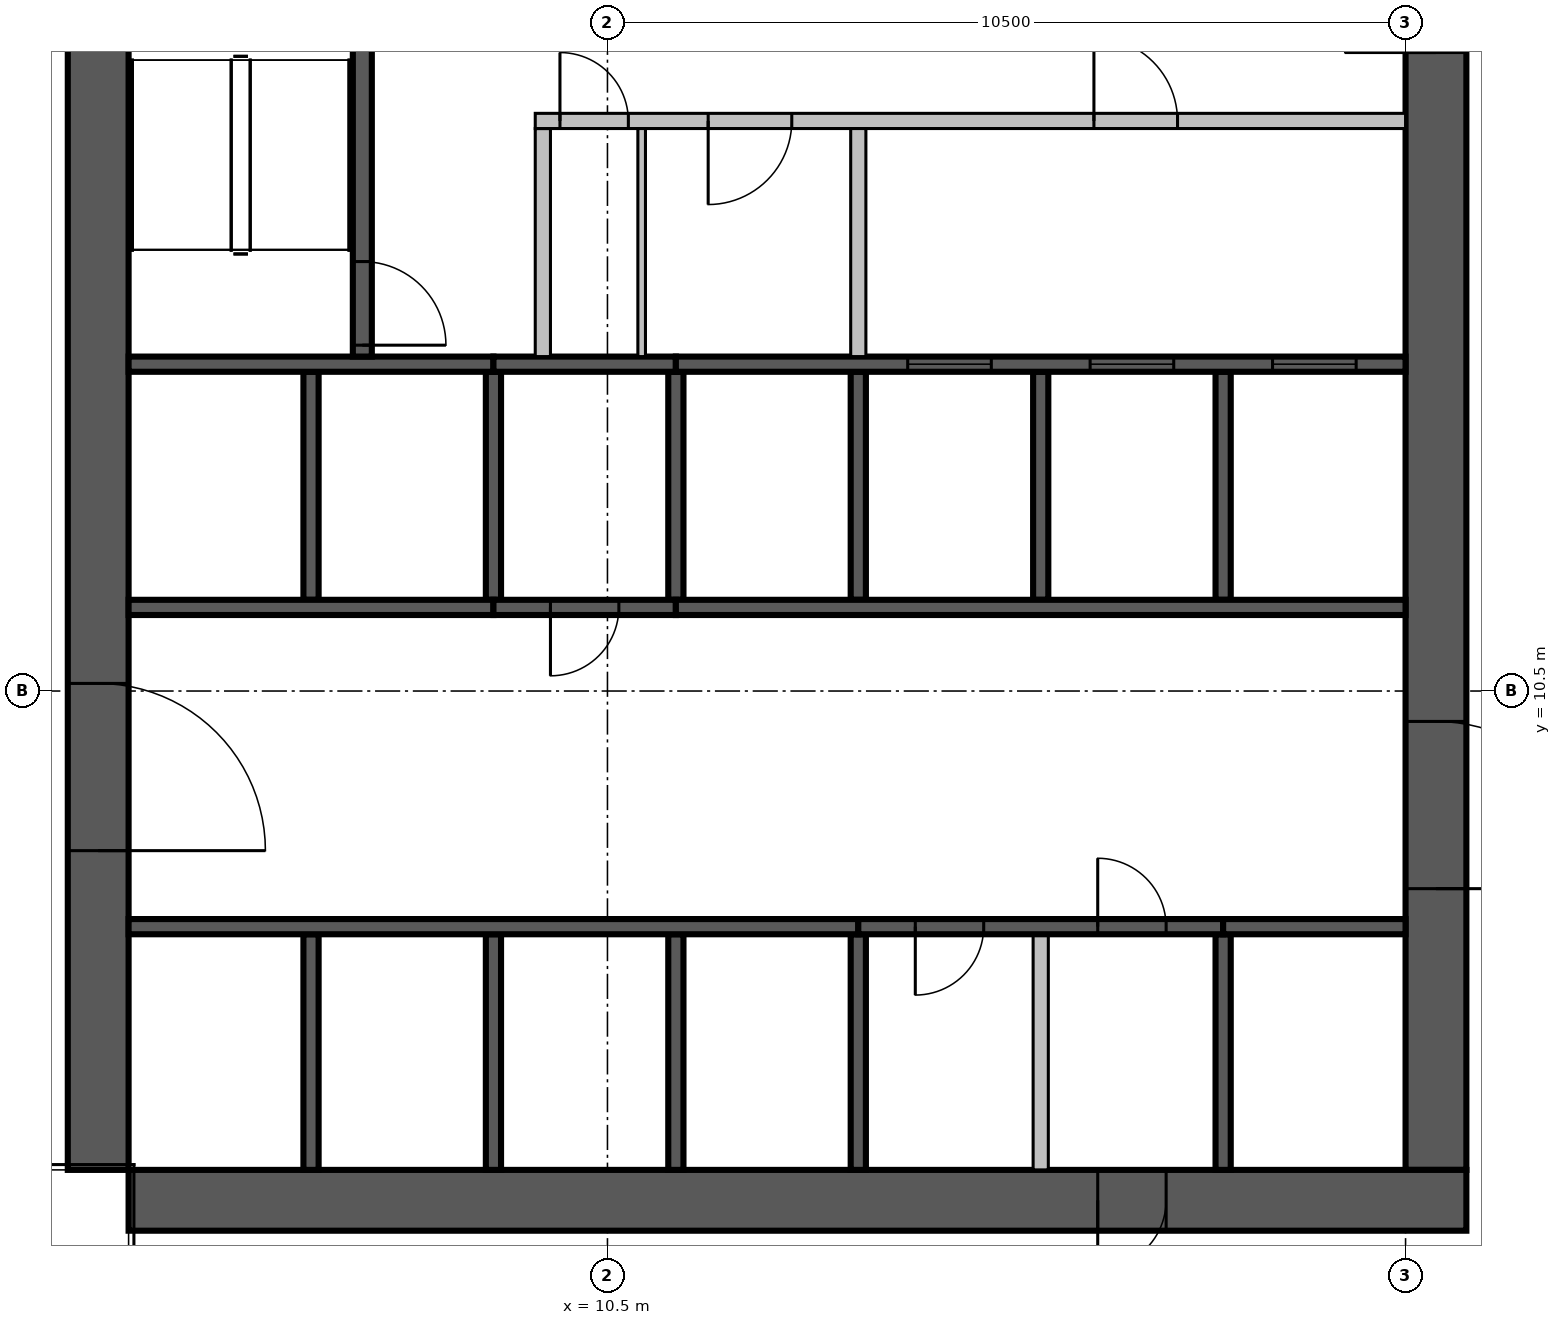
"""IFC4 building model, lengths in metres.
Left out: names, types, materials, properties, quantities, classifications, styles, units other than length and angle.
Written with IfcOpenShell. Run it as: python <this file> out.ifc"""

import sys

from ifc_helpers import new_model, si_unit, direction, frame, frame_2d, origin, place, context, subcontext, project, spatial, rectangle, extrude, source, transform, mapped, element, fill, save


model = new_model("IFC4")
c1 = context("Model", 3, precision=1e-05, world=origin(), true_north=direction((0.0, 1.0)))
c2 = subcontext(c1, "Body", "Model", "MODEL_VIEW")
j1 = project(units=[si_unit("LENGTHUNIT", "METRE"), si_unit("PLANEANGLEUNIT", "RADIAN")], contexts=[c1])
p1 = place(None, origin())
s1 = spatial("IfcSite", under=j1, at=p1, CompositionType="ELEMENT")
p2 = place(p1, origin())
s2 = spatial("IfcBuilding", under=s1, at=p2, CompositionType="ELEMENT")
p3 = place(p2, frame((0.0, 0.0, 269.0)))
s3 = spatial("IfcBuildingStorey", under=s2, at=p3, CompositionType="ELEMENT", Elevation=269.0)
p4 = place(p3, frame((3.8, 4.2, 0.0), z_axis=(0.0, 0.0, 1.0), x_axis=(0.0, 1.0, 0.0)))
e1 = element("IfcWall", 1, at=p4, inside=s3, PredefinedType="SHEAR", context=c2, shape_type="SweptSolid", body=[
    extrude(rectangle(XDim=17.6, YDim=0.8, at=frame_2d((8.8, 0.0))), origin(), (0.0, 0.0, 1.0), 8.0),
])
m1 = source(origin(), c2, "Body", "SweptSolid", [
    extrude(rectangle(XDim=2.2, YDim=2.1, at=frame_2d((1.1, 1.05))), frame((0.0, 0.41, 0.0), z_axis=(0.0, -1.0, 0.0), x_axis=(1.0, 0.0, 0.0)), (0.0, 0.0, 1.0), 0.82),
])
p5 = place(p4, frame((4.2, 0.0, 0.0)))
e2 = element("IfcOpeningElement", 2, at=p5, cuts=e1, PredefinedType="OPENING", context=c2, shape_type="MappedRepresentation", body=[
    mapped(m1, transform((0.0, 0.0, 0.0), scale=1.0)),
])
p6 = place(p3, frame((21.4, 4.2, 0.0), z_axis=(0.0, 0.0, 1.0), x_axis=(0.0, 1.0, 0.0)))
e3 = element("IfcWall", 3, at=p6, inside=s3, PredefinedType="SHEAR", context=c2, shape_type="SweptSolid", body=[
    extrude(rectangle(XDim=16.8, YDim=0.8, at=frame_2d((8.4, 0.0))), origin(), (0.0, 0.0, 1.0), 8.0),
])
p7 = place(p6, frame((3.7, 0.0, 0.0)))
e4 = element("IfcOpeningElement", 4, at=p7, cuts=e3, PredefinedType="OPENING", context=c2, shape_type="MappedRepresentation", body=[
    mapped(m1, transform((0.0, 0.0, 0.0), scale=1.0)),
])
m2 = source(origin(), c2, "Body", "SweptSolid", [
    extrude(rectangle(XDim=1.2, YDim=2.1, at=frame_2d((0.6, 1.05))), frame((0.0, 0.41, 0.0), z_axis=(0.0, -1.0, 0.0), x_axis=(1.0, 0.0, 0.0)), (0.0, 0.0, 1.0), 0.82),
])
p8 = place(p6, frame((14.7, 0.0, 0.0)))
e5 = element("IfcOpeningElement", 5, at=p8, cuts=e3, PredefinedType="OPENING", context=c2, shape_type="MappedRepresentation", body=[
    mapped(m2, transform((0.0, 0.0, 0.0), scale=1.0)),
])
m3 = source(origin(), c2, "Body", "SweptSolid", [
    extrude(rectangle(XDim=17.6, YDim=0.8, at=frame_2d((8.8, 0.0))), origin(), (0.0, 0.0, 1.0), 8.0),
])
p9 = place(p3, frame((4.2, 3.8, 0.0), z_axis=(0.0, 0.0, 1.0), x_axis=(1.0, 0.0, 0.0)))
e6 = element("IfcWall", 6, at=p9, inside=s3, PredefinedType="SHEAR", context=c2, shape_type="MappedRepresentation", body=[
    mapped(m3, transform((0.0, 0.0, 0.0), scale=1.0)),
])
m4 = source(origin(), c2, "Body", "SweptSolid", [
    extrude(rectangle(XDim=0.9, YDim=2.1, at=frame_2d((0.45, 1.05))), frame((0.0, 0.41, 0.0), z_axis=(0.0, -1.0, 0.0), x_axis=(1.0, 0.0, 0.0)), (0.0, 0.0, 1.0), 0.82),
])
p10 = place(p9, frame((12.75, 0.0, 0.0)))
e7 = element("IfcOpeningElement", 7, at=p10, cuts=e6, PredefinedType="OPENING", context=c2, shape_type="MappedRepresentation", body=[
    mapped(m4, transform((0.0, 0.0, 0.0), scale=1.0)),
])
m5 = source(origin(), c2, "Body", "SweptSolid", [
    extrude(rectangle(XDim=3.1, YDim=0.2, at=frame_2d((1.55, 0.0))), origin(), (0.0, 0.0, 1.0), 8.0),
])
for number, where, z_axis, x_axis in (
    (8, (6.6, 4.2, 0.0), (0.0, 0.0, 1.0), (0.0, 1.0, 0.0)),
    (9, (9.0, 4.2, 0.0), (0.0, 0.0, 1.0), (0.0, 1.0, 0.0)),
    (10, (11.4, 4.2, 0.0), (0.0, 0.0, 1.0), (0.0, 1.0, 0.0)),
):
    element("IfcWall", number, at=place(p3, frame(where, z_axis=z_axis, x_axis=x_axis)), inside=s3, PredefinedType="SOLIDWALL", context=c2, shape_type="MappedRepresentation", body=[
        mapped(m5, transform((0.0, 0.0, 0.0), scale=1.0)),
    ])
p11 = place(p3, frame((13.8, 4.2, 0.0), z_axis=(0.0, 0.0, 1.0), x_axis=(0.0, 1.0, 0.0)))
e11 = element("IfcWall", 11, at=p11, inside=s3, PredefinedType="SOLIDWALL", context=c2, shape_type="SweptSolid", body=[
    extrude(rectangle(XDim=3.1, YDim=0.2, at=frame_2d((1.55, 0.0))), origin(), (0.0, 0.0, 1.0), 7.6),
])
m6 = source(origin(), c2, "Body", "SweptSolid", [
    extrude(rectangle(XDim=3.1, YDim=0.2, at=frame_2d((1.55, 0.0))), origin(), (0.0, 0.0, 1.0), 7.6),
])
p12 = place(p3, frame((18.6, 4.2, 0.0), z_axis=(0.0, 0.0, 1.0), x_axis=(0.0, 1.0, 0.0)))
e12 = element("IfcWall", 12, at=p12, inside=s3, PredefinedType="SOLIDWALL", context=c2, shape_type="MappedRepresentation", body=[
    mapped(m6, transform((0.0, 0.0, 0.0), scale=1.0)),
])
p13 = place(p3, frame((16.2, 4.2, 0.0), z_axis=(0.0, 0.0, 1.0), x_axis=(0.0, 1.0, 0.0)))
e13 = element("IfcWall", 13, at=p13, inside=s3, PredefinedType="PARTITIONING", context=c2, shape_type="SweptSolid", body=[
    extrude(rectangle(XDim=3.1, YDim=0.2, at=frame_2d((1.55, 0.0))), origin(), (0.0, 0.0, 1.0), 7.6),
])
m7 = source(origin(), c2, "Body", "SweptSolid", [
    extrude(rectangle(XDim=3.0, YDim=0.2, at=frame_2d((1.5, 0.0))), origin(), (0.0, 0.0, 1.0), 8.0),
])
p14 = place(p3, frame((6.6, 11.7, 0.0), z_axis=(0.0, 0.0, 1.0), x_axis=(0.0, 1.0, 0.0)))
e14 = element("IfcWall", 14, at=p14, inside=s3, PredefinedType="SOLIDWALL", context=c2, shape_type="MappedRepresentation", body=[
    mapped(m7, transform((0.0, 0.0, 0.0), scale=1.0)),
])
m8 = source(origin(), c2, "Body", "SweptSolid", [
    extrude(rectangle(XDim=3.0, YDim=0.2, at=frame_2d((1.5, 0.0))), origin(), (0.0, 0.0, 1.0), 7.6),
])
for number, where, z_axis, x_axis in (
    (15, (9.0, 11.7, 0.0), (0.0, 0.0, 1.0), (0.0, 1.0, 0.0)),
    (16, (11.4, 11.7, 0.0), (0.0, 0.0, 1.0), (0.0, 1.0, 0.0)),
):
    element("IfcWall", number, at=place(p3, frame(where, z_axis=z_axis, x_axis=x_axis)), inside=s3, PredefinedType="SOLIDWALL", context=c2, shape_type="MappedRepresentation", body=[
        mapped(m8, transform((0.0, 0.0, 0.0), scale=1.0)),
    ])
for number, where, z_axis, x_axis in (
    (17, (13.8, 11.7, 0.0), (0.0, 0.0, 1.0), (0.0, 1.0, 0.0)),
    (18, (16.2, 11.7, 0.0), (0.0, 0.0, 1.0), (0.0, 1.0, 0.0)),
    (19, (18.6, 11.7, 0.0), (0.0, 0.0, 1.0), (0.0, 1.0, 0.0)),
):
    element("IfcWall", number, at=place(p3, frame(where, z_axis=z_axis, x_axis=x_axis)), inside=s3, PredefinedType="SOLIDWALL", context=c2, shape_type="MappedRepresentation", body=[
        mapped(m7, transform((0.0, 0.0, 0.0), scale=1.0)),
    ])
m9 = source(origin(), c2, "Body", "SweptSolid", [
    extrude(rectangle(XDim=9.6, YDim=0.2, at=frame_2d((4.8, 0.0))), origin(), (0.0, 0.0, 1.0), 8.0),
])
p15 = place(p3, frame((4.2, 7.4, 0.0), z_axis=(0.0, 0.0, 1.0), x_axis=(1.0, 0.0, 0.0)))
e20 = element("IfcWall", 20, at=p15, inside=s3, PredefinedType="SOLIDWALL", context=c2, shape_type="MappedRepresentation", body=[
    mapped(m9, transform((0.0, 0.0, 0.0), scale=1.0)),
])
p16 = place(p3, frame((13.8, 7.4, 0.0), z_axis=(0.0, 0.0, 1.0), x_axis=(1.0, 0.0, 0.0)))
e21 = element("IfcWall", 21, at=p16, inside=s3, PredefinedType="SOLIDWALL", context=c2, shape_type="SweptSolid", body=[
    extrude(rectangle(XDim=4.8, YDim=0.2, at=frame_2d((2.4, 0.0))), origin(), (0.0, 0.0, 1.0), 7.6),
])
m10 = source(origin(), c2, "Body", "SweptSolid", [
    extrude(rectangle(XDim=0.9, YDim=2.1, at=frame_2d((0.45, 1.05))), frame((0.0, 0.11, 0.0), z_axis=(0.0, -1.0, 0.0), x_axis=(1.0, 0.0, 0.0)), (0.0, 0.0, 1.0), 0.22),
])
p17 = place(p16, frame((0.75, 0.0, 0.0)))
e22 = element("IfcOpeningElement", 22, at=p17, cuts=e21, PredefinedType="OPENING", context=c2, shape_type="MappedRepresentation", body=[
    mapped(m10, transform((0.0, 0.0, 0.0), scale=1.0)),
])
p18 = place(p16, frame((3.15, 0.0, 0.0)))
e23 = element("IfcOpeningElement", 23, at=p18, cuts=e21, PredefinedType="OPENING", context=c2, shape_type="MappedRepresentation", body=[
    mapped(m10, transform((0.0, 0.0, 0.0), scale=1.0)),
])
p19 = place(p3, frame((18.6, 7.4, 0.0), z_axis=(0.0, 0.0, 1.0), x_axis=(1.0, 0.0, 0.0)))
e24 = element("IfcWall", 24, at=p19, inside=s3, PredefinedType="SOLIDWALL", context=c2, shape_type="SweptSolid", body=[
    extrude(rectangle(XDim=2.4, YDim=0.2, at=frame_2d((1.2, 0.0))), origin(), (0.0, 0.0, 1.0), 8.0),
])
m11 = source(origin(), c2, "Body", "SweptSolid", [
    extrude(rectangle(XDim=4.8, YDim=0.2, at=frame_2d((2.4, 0.0))), origin(), (0.0, 0.0, 1.0), 8.0),
])
p20 = place(p3, frame((4.2, 11.6, 0.0), z_axis=(0.0, 0.0, 1.0), x_axis=(1.0, 0.0, 0.0)))
e25 = element("IfcWall", 25, at=p20, inside=s3, PredefinedType="SOLIDWALL", context=c2, shape_type="MappedRepresentation", body=[
    mapped(m11, transform((0.0, 0.0, 0.0), scale=1.0)),
])
m12 = source(origin(), c2, "Body", "SweptSolid", [
    extrude(rectangle(XDim=2.4, YDim=0.2, at=frame_2d((1.2, 0.0))), origin(), (0.0, 0.0, 1.0), 7.6),
])
p21 = place(p3, frame((9.0, 11.6, 0.0), z_axis=(0.0, 0.0, 1.0), x_axis=(1.0, 0.0, 0.0)))
e26 = element("IfcWall", 26, at=p21, inside=s3, PredefinedType="SOLIDWALL", context=c2, shape_type="MappedRepresentation", body=[
    mapped(m12, transform((0.0, 0.0, 0.0), scale=1.0)),
])
p22 = place(p21, frame((0.75, 0.0, 0.0)))
e27 = element("IfcOpeningElement", 27, at=p22, cuts=e26, PredefinedType="OPENING", context=c2, shape_type="MappedRepresentation", body=[
    mapped(m10, transform((0.0, 0.0, 0.0), scale=1.0)),
])
p23 = place(p3, frame((11.4, 11.6, 0.0), z_axis=(0.0, 0.0, 1.0), x_axis=(1.0, 0.0, 0.0)))
e28 = element("IfcWall", 28, at=p23, inside=s3, PredefinedType="SOLIDWALL", context=c2, shape_type="MappedRepresentation", body=[
    mapped(m9, transform((0.0, 0.0, 0.0), scale=1.0)),
])
p24 = place(p3, frame((4.2, 14.8, 0.0), z_axis=(0.0, 0.0, 1.0), x_axis=(1.0, 0.0, 0.0)))
e29 = element("IfcWall", 29, at=p24, inside=s3, PredefinedType="SOLIDWALL", context=c2, shape_type="MappedRepresentation", body=[
    mapped(m11, transform((0.0, 0.0, 0.0), scale=1.0)),
])
p25 = place(p3, frame((9.0, 14.8, 0.0), z_axis=(0.0, 0.0, 1.0), x_axis=(1.0, 0.0, 0.0)))
e30 = element("IfcWall", 30, at=p25, inside=s3, PredefinedType="SOLIDWALL", context=c2, shape_type="MappedRepresentation", body=[
    mapped(m12, transform((0.0, 0.0, 0.0), scale=1.0)),
])
p26 = place(p3, frame((11.4, 14.8, 0.0), z_axis=(0.0, 0.0, 1.0), x_axis=(1.0, 0.0, 0.0)))
e31 = element("IfcWall", 31, at=p26, inside=s3, PredefinedType="SOLIDWALL", context=c2, shape_type="MappedRepresentation", body=[
    mapped(m9, transform((0.0, 0.0, 0.0), scale=1.0)),
])
m13 = source(origin(), c2, "Body", "SweptSolid", [
    extrude(rectangle(XDim=1.1, YDim=2.1, at=frame_2d((0.55, 1.05))), frame((0.0, 0.11, 0.0), z_axis=(0.0, -1.0, 0.0), x_axis=(1.0, 0.0, 0.0)), (0.0, 0.0, 1.0), 0.22),
])
p27 = place(p26, frame((3.05, 0.0, 0.0)))
e32 = element("IfcOpeningElement", 32, at=p27, cuts=e31, PredefinedType="OPENING", context=c2, shape_type="MappedRepresentation", body=[
    mapped(m13, transform((0.0, 0.0, 0.0), scale=1.0)),
])
p28 = place(p26, frame((5.45, 0.0, 0.0)))
e33 = element("IfcOpeningElement", 33, at=p28, cuts=e31, PredefinedType="OPENING", context=c2, shape_type="MappedRepresentation", body=[
    mapped(m13, transform((0.0, 0.0, 0.0), scale=1.0)),
])
p29 = place(p26, frame((7.85, 0.0, 0.0)))
e34 = element("IfcOpeningElement", 34, at=p29, cuts=e31, PredefinedType="OPENING", context=c2, shape_type="MappedRepresentation", body=[
    mapped(m13, transform((0.0, 0.0, 0.0), scale=1.0)),
])
m14 = source(origin(), c2, "Body", "SweptSolid", [
    extrude(rectangle(XDim=6.6, YDim=0.25, at=frame_2d((3.3, 0.0))), origin(), (0.0, 0.0, 1.0), 7.6),
])
p30 = place(p3, frame((7.275, 14.9, 0.0), z_axis=(0.0, 0.0, 1.0), x_axis=(0.0, 1.0, 0.0)))
e35 = element("IfcWall", 35, at=p30, inside=s3, PredefinedType="SOLIDWALL", context=c2, shape_type="MappedRepresentation", body=[
    mapped(m14, transform((0.0, 0.0, 0.0), scale=1.0)),
])
m15 = source(origin(), c2, "Body", "SweptSolid", [
    extrude(rectangle(XDim=1.1, YDim=2.1, at=frame_2d((0.55, 1.05))), frame((0.0, 0.135, 0.0), z_axis=(0.0, -1.0, 0.0), x_axis=(1.0, 0.0, 0.0)), (0.0, 0.0, 1.0), 0.27),
])
p31 = place(p30, frame((0.15, 0.0, 0.0)))
e36 = element("IfcOpeningElement", 36, at=p31, cuts=e35, PredefinedType="OPENING", context=c2, shape_type="MappedRepresentation", body=[
    mapped(m15, transform((0.0, 0.0, 0.0), scale=1.0)),
])
m16 = source(origin(), c2, "Body", "SweptSolid", [
    extrude(rectangle(XDim=3.0, YDim=0.2, at=frame_2d((1.5, 0.0))), origin(), (0.0, 0.0, 1.0), 7.6),
])
p32 = place(p3, frame((9.65, 14.9, 0.0), z_axis=(0.0, 0.0, 1.0), x_axis=(0.0, 1.0, 0.0)))
e37 = element("IfcWall", 37, at=p32, inside=s3, PredefinedType="PARTITIONING", context=c2, shape_type="MappedRepresentation", body=[
    mapped(m16, transform((0.0, 0.0, 0.0), scale=1.0)),
])
m17 = source(origin(), c2, "Body", "SweptSolid", [
    extrude(rectangle(XDim=11.45, YDim=0.2, at=frame_2d((5.725, 0.0))), origin(), (0.0, 0.0, 1.0), 7.6),
])
p33 = place(p3, frame((9.55, 18.0, 0.0), z_axis=(0.0, 0.0, 1.0), x_axis=(1.0, 0.0, 0.0)))
e38 = element("IfcWall", 38, at=p33, inside=s3, PredefinedType="PARTITIONING", context=c2, shape_type="MappedRepresentation", body=[
    mapped(m17, transform((0.0, 0.0, 0.0), scale=1.0)),
])
p34 = place(p33, frame((0.325, 0.0, 0.0)))
e39 = element("IfcOpeningElement", 39, at=p34, cuts=e38, PredefinedType="OPENING", context=c2, shape_type="MappedRepresentation", body=[
    mapped(m10, transform((0.0, 0.0, 0.0), scale=1.0)),
])
p35 = place(p33, frame((2.275, 0.0, 0.0)))
e40 = element("IfcOpeningElement", 40, at=p35, cuts=e38, PredefinedType="OPENING", context=c2, shape_type="MappedRepresentation", body=[
    mapped(m13, transform((0.0, 0.0, 0.0), scale=1.0)),
])
p36 = place(p33, frame((7.35, 0.0, 0.0)))
e41 = element("IfcOpeningElement", 41, at=p36, cuts=e38, PredefinedType="OPENING", context=c2, shape_type="MappedRepresentation", body=[
    mapped(m13, transform((0.0, 0.0, 0.0), scale=1.0)),
])
p37 = place(p3, frame((13.8, 14.9, 0.0), z_axis=(0.0, 0.0, 1.0), x_axis=(0.0, 1.0, 0.0)))
e42 = element("IfcWall", 42, at=p37, inside=s3, PredefinedType="PARTITIONING", context=c2, shape_type="MappedRepresentation", body=[
    mapped(m16, transform((0.0, 0.0, 0.0), scale=1.0)),
])
m18 = source(origin(), c2, "Body", "SweptSolid", [
    extrude(rectangle(XDim=3.0, YDim=0.1, at=frame_2d((1.5, 0.0))), origin(), (0.0, 0.0, 1.0), 7.6),
])
p38 = place(p3, frame((10.95, 14.9, 0.0), z_axis=(0.0, 0.0, 1.0), x_axis=(0.0, 1.0, 0.0)))
e43 = element("IfcWall", 43, at=p38, inside=s3, PredefinedType="PARTITIONING", context=c2, shape_type="MappedRepresentation", body=[
    mapped(m18, transform((0.0, 0.0, 0.0), scale=1.0)),
])
m19 = source(origin(), c2, "Body", "SweptSolid", [
    extrude(rectangle(XDim=0.9, YDim=2.1, at=frame_2d((0.45, 1.05))), frame((0.0, 0.025, 0.0), z_axis=(0.0, -1.0, 0.0), x_axis=(1.0, 0.0, 0.0)), (0.0, 0.0, 1.0), 0.05),
])
p39 = place(p17, origin())
e44 = element("IfcDoor", 44, at=p39, inside=s3, OperationType="SINGLE_SWING_RIGHT", PredefinedType="DOOR", context=c2, shape_type="MappedRepresentation", body=[
    mapped(m19, transform((0.0, 0.0, 0.0), scale=1.0)),
])
fill(e22, e44)
p40 = place(p18, origin())
e45 = element("IfcDoor", 45, at=p40, inside=s3, OperationType="SINGLE_SWING_LEFT", PredefinedType="DOOR", context=c2, shape_type="MappedRepresentation", body=[
    mapped(m19, transform((0.0, 0.0, 0.0), scale=1.0)),
])
fill(e23, e45)
p41 = place(p22, origin())
e46 = element("IfcDoor", 46, at=p41, inside=s3, OperationType="SINGLE_SWING_RIGHT", PredefinedType="DOOR", context=c2, shape_type="MappedRepresentation", body=[
    mapped(m19, transform((0.0, 0.0, 0.0), scale=1.0)),
])
fill(e27, e46)
m20 = source(origin(), c2, "Body", "SweptSolid", [
    extrude(rectangle(XDim=1.1, YDim=2.1, at=frame_2d((0.55, 1.05))), frame((0.0, 0.025, 0.0), z_axis=(0.0, -1.0, 0.0), x_axis=(1.0, 0.0, 0.0)), (0.0, 0.0, 1.0), 0.05),
])
p42 = place(p27, origin())
e47 = element("IfcDoor", 47, at=p42, inside=s3, OperationType="SLIDING_TO_LEFT", PredefinedType="DOOR", context=c2, shape_type="MappedRepresentation", body=[
    mapped(m20, transform((0.0, 0.0, 0.0), scale=1.0)),
])
fill(e32, e47)
p43 = place(p28, origin())
e48 = element("IfcDoor", 48, at=p43, inside=s3, OperationType="SLIDING_TO_LEFT", PredefinedType="DOOR", context=c2, shape_type="MappedRepresentation", body=[
    mapped(m20, transform((0.0, 0.0, 0.0), scale=1.0)),
])
fill(e33, e48)
p44 = place(p29, origin())
e49 = element("IfcDoor", 49, at=p44, inside=s3, OperationType="SLIDING_TO_LEFT", PredefinedType="DOOR", context=c2, shape_type="MappedRepresentation", body=[
    mapped(m20, transform((0.0, 0.0, 0.0), scale=1.0)),
])
fill(e34, e49)
p45 = place(p31, origin())
e50 = element("IfcDoor", 50, at=p45, inside=s3, OperationType="SINGLE_SWING_RIGHT", PredefinedType="DOOR", context=c2, shape_type="MappedRepresentation", body=[
    mapped(m20, transform((0.0, 0.0, 0.0), scale=1.0)),
])
fill(e36, e50)
p46 = place(p34, origin())
e51 = element("IfcDoor", 51, at=p46, inside=s3, OperationType="SINGLE_SWING_LEFT", PredefinedType="DOOR", context=c2, shape_type="MappedRepresentation", body=[
    mapped(m19, transform((0.0, 0.0, 0.0), scale=1.0)),
])
fill(e39, e51)
p47 = place(p35, origin())
e52 = element("IfcDoor", 52, at=p47, inside=s3, OperationType="SINGLE_SWING_RIGHT", PredefinedType="DOOR", context=c2, shape_type="MappedRepresentation", body=[
    mapped(m20, transform((0.0, 0.0, 0.0), scale=1.0)),
])
fill(e40, e52)
p48 = place(p36, origin())
e53 = element("IfcDoor", 53, at=p48, inside=s3, OperationType="SINGLE_SWING_LEFT", PredefinedType="DOOR", context=c2, shape_type="MappedRepresentation", body=[
    mapped(m20, transform((0.0, 0.0, 0.0), scale=1.0)),
])
fill(e41, e53)
m21 = source(origin(), c2, "Body", "SweptSolid", [
    extrude(rectangle(XDim=2.2, YDim=2.1, at=frame_2d((1.1, 1.05))), frame((0.0, 0.025, 0.0), z_axis=(0.0, -1.0, 0.0), x_axis=(1.0, 0.0, 0.0)), (0.0, 0.0, 1.0), 0.05),
])
p49 = place(p7, origin())
e54 = element("IfcDoor", 54, at=p49, inside=s3, OperationType="DOUBLE_DOOR_SINGLE_SWING", PredefinedType="DOOR", context=c2, shape_type="MappedRepresentation", body=[
    mapped(m21, transform((0.0, 0.0, 0.0), scale=1.0)),
])
fill(e4, e54)
p50 = place(p5, origin())
e55 = element("IfcDoor", 55, at=p50, inside=s3, OperationType="DOUBLE_DOOR_SINGLE_SWING", PredefinedType="DOOR", context=c2, shape_type="MappedRepresentation", body=[
    mapped(m21, transform((0.0, 0.0, 0.0), scale=1.0)),
])
fill(e2, e55)
p51 = place(p10, origin())
e56 = element("IfcDoor", 56, at=p51, inside=s3, OperationType="SINGLE_SWING_RIGHT", PredefinedType="DOOR", context=c2, shape_type="MappedRepresentation", body=[
    mapped(m19, transform((0.0, 0.0, 0.0), scale=1.0)),
])
fill(e7, e56)
save(model, sys.argv[1])
